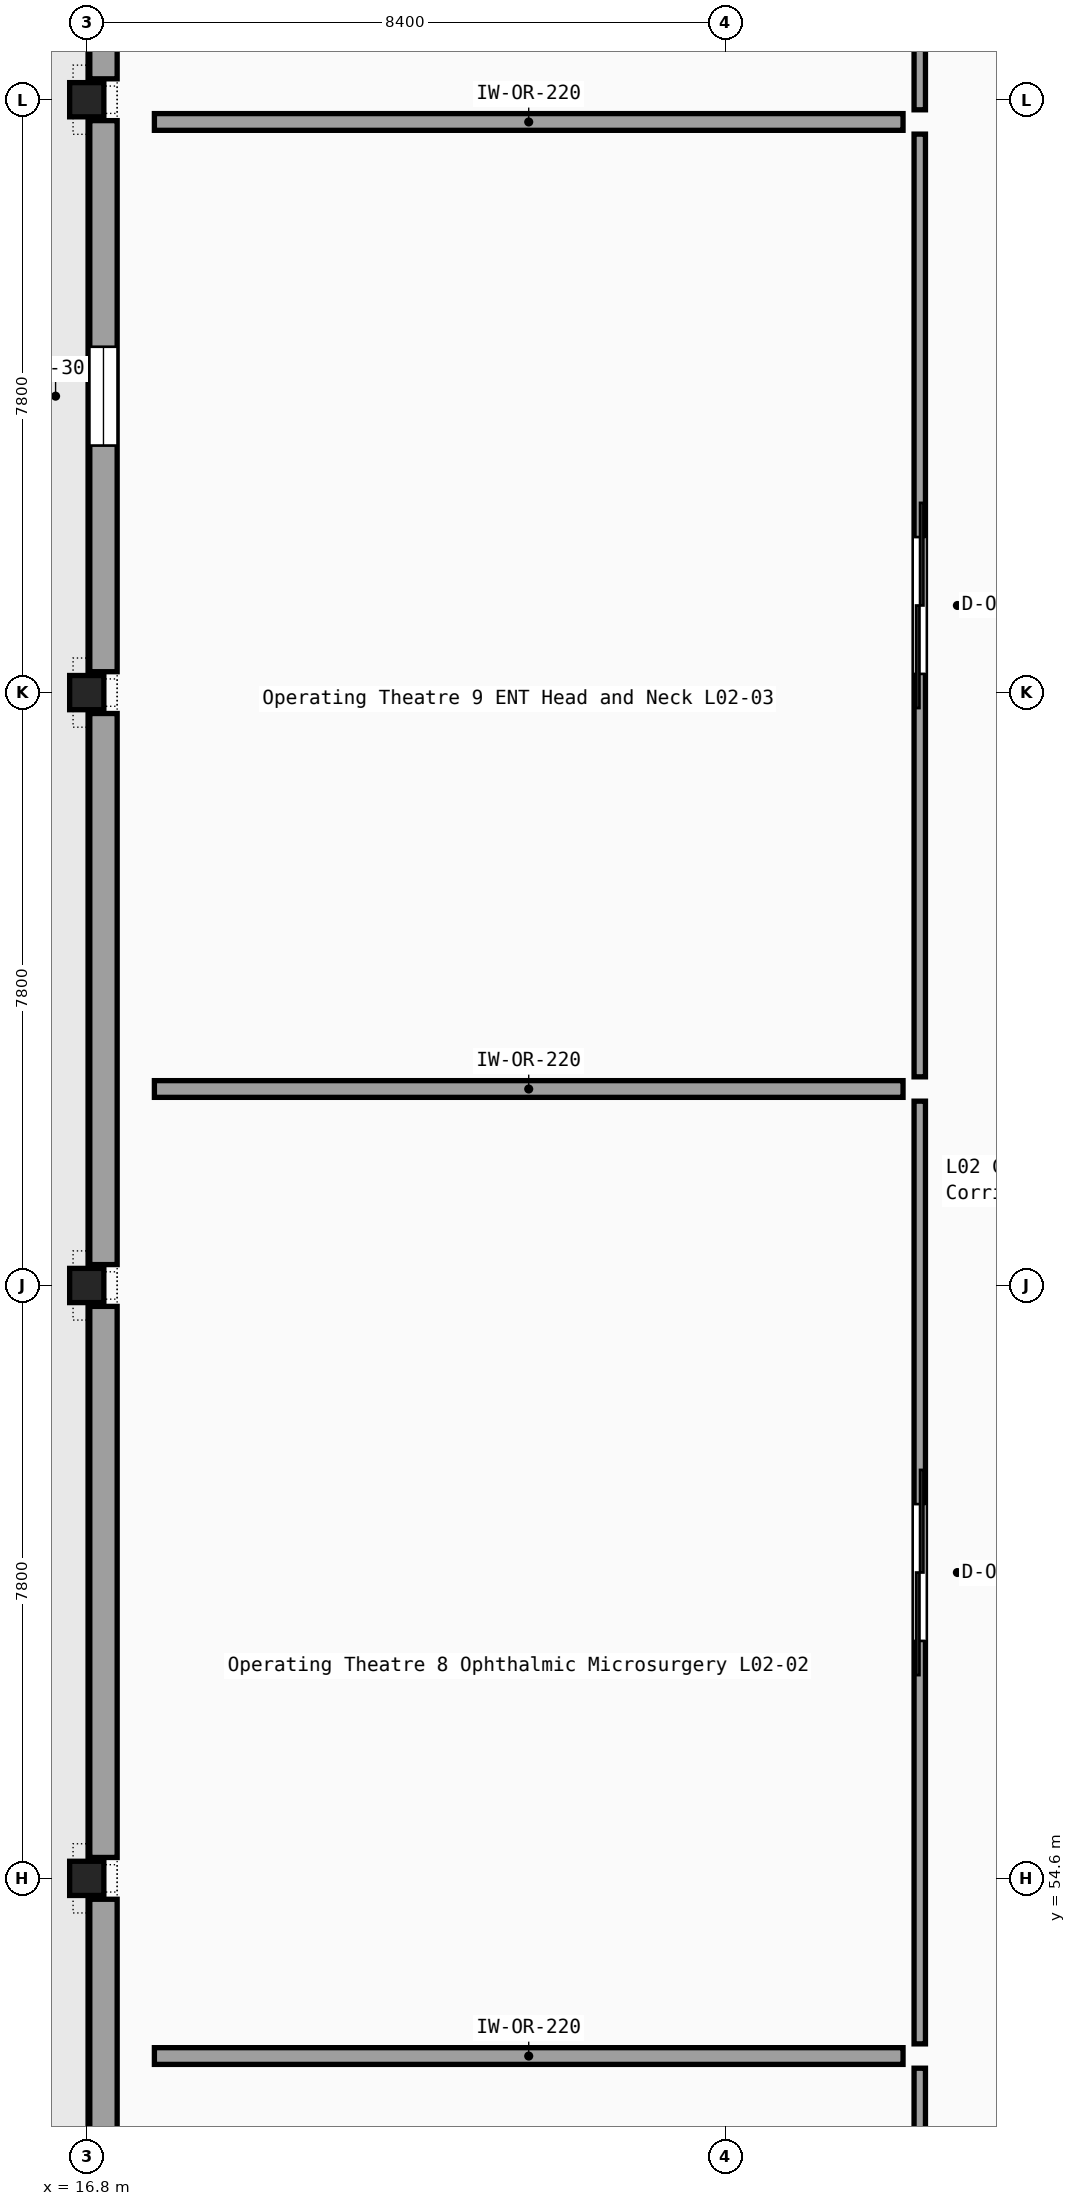
"""IFC4 building model, lengths in metres.
Left out: names, types, materials, properties, quantities, classifications, styles, units other than length and angle.
Written with IfcOpenShell. Run it as: python <this file> out.ifc"""

import sys

from ifc_helpers import new_model, si_unit, direction, frame, frame_2d, origin, origin_2d, place, context, subcontext, project, spatial, rectangle, i_section, extrude, element, fill, save


model = new_model("IFC4")
c1 = context("Model", 3, precision=1e-05, world=origin(), true_north=direction((0.0, 1.0)))
c2 = subcontext(c1, "Body", "Model", "MODEL_VIEW")
j1 = project(units=[si_unit("LENGTHUNIT", "METRE"), si_unit("PLANEANGLEUNIT", "RADIAN")], contexts=[c1])
p1 = place(None, origin())
s1 = spatial("IfcSite", under=j1, at=p1, CompositionType="ELEMENT")
p2 = place(p1, origin())
s2 = spatial("IfcBuilding", under=s1, at=p2, CompositionType="ELEMENT")
p3 = place(p2, frame((0.0, 0.0, 10.2)))
s3 = spatial("IfcBuildingStorey", under=s2, at=p3, CompositionType="ELEMENT", Elevation=10.2)
for number, where, z_axis, x_axis in (
    (1, (16.8, 54.6, 0.0), (0.0, 0.0, 1.0), (1.0, 0.0, 0.0)),
    (2, (16.8, 62.4, 0.0), (0.0, 0.0, 1.0), (1.0, 0.0, 0.0)),
    (3, (16.8, 70.2, 0.0), (0.0, 0.0, 1.0), (1.0, 0.0, 0.0)),
    (4, (16.8, 78.0, 0.0), (0.0, 0.0, 1.0), (1.0, 0.0, 0.0)),
):
    element("IfcColumn", number, at=place(p3, frame(where, z_axis=z_axis, x_axis=x_axis)), inside=s3, PredefinedType="COLUMN", context=c2, shape_type="SweptSolid", body=[
        extrude(i_section(OverallWidth=0.3, OverallDepth=0.45, WebThickness=0.014, FlangeThickness=0.026, FilletRadius=0.027, at=origin_2d()), origin(), (0.0, 0.0, 1.0), 4.65),
    ])
for number, where, z_axis, x_axis in (
    (5, (17.02, 47.075, 0.0), (0.0, 0.0, 1.0), (0.0, 1.0, 0.0)),
    (6, (17.02, 54.875, 0.0), (0.0, 0.0, 1.0), (0.0, 1.0, 0.0)),
    (7, (17.02, 62.675, 0.0), (0.0, 0.0, 1.0), (0.0, 1.0, 0.0)),
):
    element("IfcWall", number, at=place(p3, frame(where, z_axis=z_axis, x_axis=x_axis)), inside=s3, PredefinedType="SOLIDWALL", context=c2, shape_type="SweptSolid", body=[
        extrude(rectangle(XDim=7.25, YDim=0.36, at=frame_2d((3.625, 0.0))), origin(), (0.0, 0.0, 1.0), 3.82),
    ])
p4 = place(p3, frame((17.02, 70.475, 0.0), z_axis=(0.0, 0.0, 1.0), x_axis=(0.0, 1.0, 0.0)))
e8 = element("IfcWall", 8, at=p4, inside=s3, PredefinedType="SOLIDWALL", context=c2, shape_type="SweptSolid", body=[
    extrude(rectangle(XDim=7.25, YDim=0.36, at=frame_2d((3.625, 0.0))), origin(), (0.0, 0.0, 1.0), 3.82),
])
p5 = place(p4, frame((2.975, 0.0, 0.9)))
e9 = element("IfcOpeningElement", 9, at=p5, cuts=e8, PredefinedType="OPENING", context=c2, shape_type="SweptSolid", body=[
    extrude(rectangle(XDim=1.3, YDim=1.6, at=frame_2d((0.65, 0.8))), frame((0.0, 0.19, 0.0), z_axis=(0.0, -1.0, 0.0), x_axis=(1.0, 0.0, 0.0)), (0.0, 0.0, 1.0), 0.38),
])
p6 = place(p3, frame((17.02, 78.275, 0.0), z_axis=(0.0, 0.0, 1.0), x_axis=(0.0, 1.0, 0.0)))
e10 = element("IfcWall", 10, at=p6, inside=s3, PredefinedType="SOLIDWALL", context=c2, shape_type="SweptSolid", body=[
    extrude(rectangle(XDim=7.25, YDim=0.36, at=frame_2d((3.625, 0.0))), origin(), (0.0, 0.0, 1.0), 3.82),
])
p7 = place(p3, frame((27.76, 39.62, 0.0), z_axis=(0.0, 0.0, 1.0), x_axis=(0.0, 1.0, 0.0)))
e11 = element("IfcWall", 11, at=p7, inside=s3, PredefinedType="PARTITIONING", context=c2, shape_type="SweptSolid", body=[
    extrude(rectangle(XDim=12.482, YDim=0.15, at=frame_2d((6.241, 0.0))), origin(), (0.0, 0.0, 1.0), 3.82),
])
p8 = place(p7, frame((5.341, 0.0, 0.0)))
e12 = element("IfcOpeningElement", 12, at=p8, cuts=e11, PredefinedType="OPENING", context=c2, shape_type="SweptSolid", body=[
    extrude(rectangle(XDim=1.8, YDim=2.4, at=frame_2d((0.9, 1.2))), frame((0.0, 0.085, 0.0), z_axis=(0.0, -1.0, 0.0), x_axis=(1.0, 0.0, 0.0)), (0.0, 0.0, 1.0), 0.17),
])
p9 = place(p3, frame((17.69, 52.262, 0.0), z_axis=(0.0, 0.0, 1.0), x_axis=(1.0, 0.0, 0.0)))
e13 = element("IfcWall", 13, at=p9, inside=s3, PredefinedType="PARTITIONING", context=c2, shape_type="SweptSolid", body=[
    extrude(rectangle(XDim=9.85, YDim=0.22, at=frame_2d((4.925, 0.0))), origin(), (0.0, 0.0, 1.0), 4.36),
])
p10 = place(p3, frame((27.76, 52.423, 0.0), z_axis=(0.0, 0.0, 1.0), x_axis=(0.0, 1.0, 0.0)))
e14 = element("IfcWall", 14, at=p10, inside=s3, PredefinedType="PARTITIONING", context=c2, shape_type="SweptSolid", body=[
    extrude(rectangle(XDim=12.402, YDim=0.15, at=frame_2d((6.201, 0.0))), origin(), (0.0, 0.0, 1.0), 3.82),
])
p11 = place(p10, frame((5.301, 0.0, 0.0)))
e15 = element("IfcOpeningElement", 15, at=p11, cuts=e14, PredefinedType="OPENING", context=c2, shape_type="SweptSolid", body=[
    extrude(rectangle(XDim=1.8, YDim=2.4, at=frame_2d((0.9, 1.2))), frame((0.0, 0.085, 0.0), z_axis=(0.0, -1.0, 0.0), x_axis=(1.0, 0.0, 0.0)), (0.0, 0.0, 1.0), 0.17),
])
p12 = place(p3, frame((17.69, 64.985, 0.0), z_axis=(0.0, 0.0, 1.0), x_axis=(1.0, 0.0, 0.0)))
e16 = element("IfcWall", 16, at=p12, inside=s3, PredefinedType="PARTITIONING", context=c2, shape_type="SweptSolid", body=[
    extrude(rectangle(XDim=9.85, YDim=0.22, at=frame_2d((4.925, 0.0))), origin(), (0.0, 0.0, 1.0), 4.36),
])
p13 = place(p3, frame((27.76, 65.145, 0.0), z_axis=(0.0, 0.0, 1.0), x_axis=(0.0, 1.0, 0.0)))
e17 = element("IfcWall", 17, at=p13, inside=s3, PredefinedType="PARTITIONING", context=c2, shape_type="SweptSolid", body=[
    extrude(rectangle(XDim=12.403, YDim=0.15, at=frame_2d((6.201, 0.0))), origin(), (0.0, 0.0, 1.0), 3.82),
])
p14 = place(p13, frame((5.301, 0.0, 0.0)))
e18 = element("IfcOpeningElement", 18, at=p14, cuts=e17, PredefinedType="OPENING", context=c2, shape_type="SweptSolid", body=[
    extrude(rectangle(XDim=1.8, YDim=2.4, at=frame_2d((0.9, 1.2))), frame((0.0, 0.085, 0.0), z_axis=(0.0, -1.0, 0.0), x_axis=(1.0, 0.0, 0.0)), (0.0, 0.0, 1.0), 0.17),
])
p15 = place(p3, frame((17.69, 77.708, 0.0), z_axis=(0.0, 0.0, 1.0), x_axis=(1.0, 0.0, 0.0)))
e19 = element("IfcWall", 19, at=p15, inside=s3, PredefinedType="PARTITIONING", context=c2, shape_type="SweptSolid", body=[
    extrude(rectangle(XDim=9.85, YDim=0.22, at=frame_2d((4.925, 0.0))), origin(), (0.0, 0.0, 1.0), 3.82),
])
p16 = place(p3, frame((27.76, 77.867, 0.0), z_axis=(0.0, 0.0, 1.0), x_axis=(0.0, 1.0, 0.0)))
e20 = element("IfcWall", 20, at=p16, inside=s3, PredefinedType="PARTITIONING", context=c2, shape_type="SweptSolid", body=[
    extrude(rectangle(XDim=12.483, YDim=0.15, at=frame_2d((6.241, 0.0))), origin(), (0.0, 0.0, 1.0), 3.82),
])
p17 = place(p16, frame((5.341, 0.0, 0.0)))
e21 = element("IfcOpeningElement", 21, at=p17, cuts=e20, PredefinedType="OPENING", context=c2, shape_type="SweptSolid", body=[
    extrude(rectangle(XDim=1.8, YDim=2.4, at=frame_2d((0.9, 1.2))), frame((0.0, 0.085, 0.0), z_axis=(0.0, -1.0, 0.0), x_axis=(1.0, 0.0, 0.0)), (0.0, 0.0, 1.0), 0.17),
])
p18 = place(p5, origin())
e22 = element("IfcWindow", 22, at=p18, inside=s3, PartitioningType="SINGLE_PANEL", PredefinedType="WINDOW", context=c2, shape_type="SweptSolid", body=[
    extrude(rectangle(XDim=1.3, YDim=1.6, at=frame_2d((0.65, 0.8))), frame((0.0, 0.03, 0.0), z_axis=(0.0, -1.0, 0.0), x_axis=(1.0, 0.0, 0.0)), (0.0, 0.0, 1.0), 0.06),
])
fill(e9, e22)
p19 = place(p11, origin())
e23 = element("IfcDoor", 23, at=p19, inside=s3, OperationType="DOUBLE_DOOR_SLIDING", PredefinedType="DOOR", context=c2, shape_type="SweptSolid", body=[
    extrude(rectangle(XDim=1.8, YDim=2.4, at=frame_2d((0.9, 1.2))), frame((0.0, 0.025, 0.0), z_axis=(0.0, -1.0, 0.0), x_axis=(1.0, 0.0, 0.0)), (0.0, 0.0, 1.0), 0.05),
])
fill(e15, e23)
p20 = place(p14, origin())
e24 = element("IfcDoor", 24, at=p20, inside=s3, OperationType="DOUBLE_DOOR_SLIDING", PredefinedType="DOOR", context=c2, shape_type="SweptSolid", body=[
    extrude(rectangle(XDim=1.8, YDim=2.4, at=frame_2d((0.9, 1.2))), frame((0.0, 0.025, 0.0), z_axis=(0.0, -1.0, 0.0), x_axis=(1.0, 0.0, 0.0)), (0.0, 0.0, 1.0), 0.05),
])
fill(e18, e24)
save(model, sys.argv[1])
